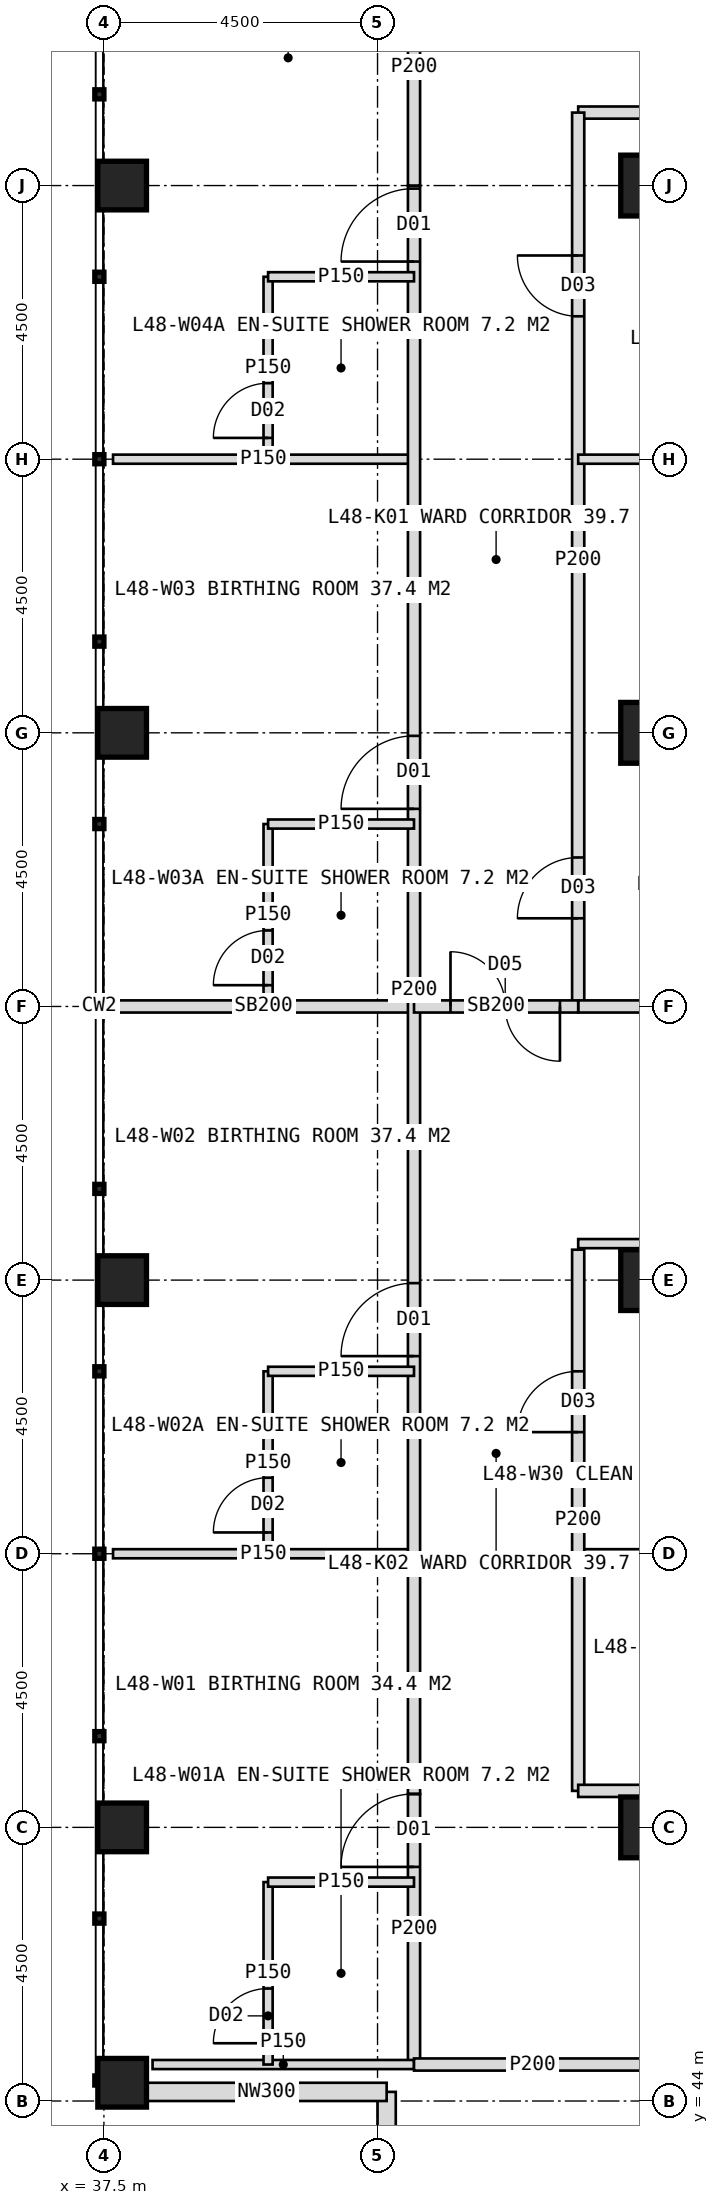
"""IFC4 building model, lengths in metres.
Left out: names, types, materials, properties, quantities, classifications, styles, units other than length and angle.
Written with IfcOpenShell. Run it as: python <this file> out.ifc"""

import sys

from ifc_helpers import new_model, si_unit, direction, frame, frame_2d, origin, origin_2d, place, context, subcontext, project, spatial, rectangle, hollow_rectangle, extrude, element, fill, save


model = new_model("IFC4")
c1 = context("Model", 3, precision=1e-05, world=origin(), true_north=direction((0.0, 1.0)))
c2 = subcontext(c1, "Body", "Model", "MODEL_VIEW")
j1 = project(units=[si_unit("LENGTHUNIT", "METRE"), si_unit("PLANEANGLEUNIT", "RADIAN")], contexts=[c1])
p1 = place(None, origin())
s1 = spatial("IfcSite", under=j1, at=p1, CompositionType="ELEMENT")
p2 = place(p1, origin())
s2 = spatial("IfcBuilding", under=s1, at=p2, CompositionType="ELEMENT")
p3 = place(p2, frame((0.0, 0.0, 201.0)))
s3 = spatial("IfcBuildingStorey", under=s2, at=p3, CompositionType="ELEMENT", Elevation=201.0)
for number, where, z_axis, x_axis in (
    (1, (46.5, 48.5, 0.0), (0.0, 0.0, 1.0), (1.0, 0.0, 0.0)),
    (2, (46.5, 75.5, 0.0), (0.0, 0.0, 1.0), (1.0, 0.0, 0.0)),
    (3, (46.5, 57.5, 0.0), (0.0, 0.0, 1.0), (1.0, 0.0, 0.0)),
    (4, (46.5, 66.5, 0.0), (0.0, 0.0, 1.0), (1.0, 0.0, 0.0)),
):
    element("IfcColumn", number, at=place(p3, frame(where, z_axis=z_axis, x_axis=x_axis)), inside=s3, PredefinedType="COLUMN", context=c2, shape_type="SweptSolid", body=[
        extrude(hollow_rectangle(XDim=1.0, YDim=1.0, WallThickness=0.1, at=origin_2d()), origin(), (0.0, 0.0, 1.0), 4.0),
    ])
for number, where, z_axis, x_axis in (
    (5, (37.8, 44.3, 0.0), (0.0, 0.0, 1.0), (1.0, 0.0, 0.0)),
    (6, (37.8, 48.5, 0.0), (0.0, 0.0, 1.0), (1.0, 0.0, 0.0)),
    (7, (37.8, 57.5, 0.0), (0.0, 0.0, 1.0), (1.0, 0.0, 0.0)),
    (8, (37.8, 66.5, 0.0), (0.0, 0.0, 1.0), (1.0, 0.0, 0.0)),
    (9, (37.8, 75.5, 0.0), (0.0, 0.0, 1.0), (1.0, 0.0, 0.0)),
):
    element("IfcColumn", number, at=place(p3, frame(where, z_axis=z_axis, x_axis=x_axis)), inside=s3, PredefinedType="COLUMN", context=c2, shape_type="SweptSolid", body=[
        extrude(hollow_rectangle(XDim=0.8, YDim=0.8, WallThickness=0.08, at=origin_2d()), origin(), (0.0, 0.0, 1.0), 4.0),
    ])
for number, where, z_axis, x_axis in (
    (10, (42.15, 40.2, 0.0), (0.0, 0.0, 1.0), (0.0, 1.0, 0.0)),
    (11, (42.15, 44.15, 0.0), (0.0, 0.0, 1.0), (-1.0, 0.0, 0.0)),
):
    element("IfcWall", number, at=place(p3, frame(where, z_axis=z_axis, x_axis=x_axis)), inside=s3, PredefinedType="ELEMENTEDWALL", context=c2, shape_type="SweptSolid", body=[
        extrude(rectangle(XDim=3.95, YDim=0.3, at=frame_2d((1.975, 0.0))), origin(), (0.0, 0.0, 1.0), 2.85),
    ])
p4 = place(p3, frame((45.3, 76.7, 0.0), z_axis=(0.0, 0.0, 1.0), x_axis=(1.0, 0.0, 0.0)))
e12 = element("IfcWall", 12, at=p4, inside=s3, PredefinedType="PARTITIONING", context=c2, shape_type="SweptSolid", body=[
    extrude(rectangle(XDim=5.7, YDim=0.2, at=frame_2d((2.85, 0.0))), origin(), (0.0, 0.0, 1.0), 3.75),
])
p5 = place(p3, frame((42.6, 53.0, 0.0), z_axis=(0.0, 0.0, 1.0), x_axis=(-1.0, 0.0, 0.0)))
e13 = element("IfcWall", 13, at=p5, inside=s3, PredefinedType="PARTITIONING", context=c2, shape_type="SweptSolid", body=[
    extrude(rectangle(XDim=4.95, YDim=0.15, at=frame_2d((2.475, 0.0))), origin(), (0.0, 0.0, 1.0), 3.75),
])
p6 = place(p3, frame((42.6, 62.0, 0.0), z_axis=(0.0, 0.0, 1.0), x_axis=(-1.0, 0.0, 0.0)))
e14 = element("IfcWall", 14, at=p6, inside=s3, PredefinedType="SOLIDWALL", context=c2, shape_type="SweptSolid", body=[
    extrude(rectangle(XDim=4.95, YDim=0.2, at=frame_2d((2.475, 0.0))), origin(), (0.0, 0.0, 1.0), 2.95),
])
p7 = place(p3, frame((42.6, 71.0, 0.0), z_axis=(0.0, 0.0, 1.0), x_axis=(-1.0, 0.0, 0.0)))
e15 = element("IfcWall", 15, at=p7, inside=s3, PredefinedType="PARTITIONING", context=c2, shape_type="SweptSolid", body=[
    extrude(rectangle(XDim=4.95, YDim=0.15, at=frame_2d((2.475, 0.0))), origin(), (0.0, 0.0, 1.0), 3.75),
])
p8 = place(p3, frame((42.6, 44.6, 0.0), z_axis=(0.0, 0.0, 1.0), x_axis=(0.0, 1.0, 0.0)))
e16 = element("IfcWall", 16, at=p8, inside=s3, PredefinedType="PARTITIONING", context=c2, shape_type="SweptSolid", body=[
    extrude(rectangle(XDim=4.45, YDim=0.2, at=frame_2d((2.225, 0.0))), origin(), (0.0, 0.0, 1.0), 2.85),
])
p9 = place(p8, frame((3.25, 0.0, 0.0)))
e17 = element("IfcOpeningElement", 17, at=p9, cuts=e16, PredefinedType="OPENING", context=c2, shape_type="SweptSolid", body=[
    extrude(rectangle(XDim=1.2, YDim=2.2, at=frame_2d((0.6, 1.1))), frame((0.0, 0.11, 0.0), z_axis=(0.0, -1.0, 0.0), x_axis=(1.0, 0.0, 0.0)), (0.0, 0.0, 1.0), 0.22),
])
p10 = place(p3, frame((42.6, 49.05, 0.0), z_axis=(0.0, 0.0, 1.0), x_axis=(0.0, 1.0, 0.0)))
e18 = element("IfcWall", 18, at=p10, inside=s3, PredefinedType="PARTITIONING", context=c2, shape_type="SweptSolid", body=[
    extrude(rectangle(XDim=26.45, YDim=0.2, at=frame_2d((13.225, 0.0))), origin(), (0.0, 0.0, 1.0), 3.75),
])
p11 = place(p10, frame((7.2, 0.0, 0.0)))
e19 = element("IfcOpeningElement", 19, at=p11, cuts=e18, PredefinedType="OPENING", context=c2, shape_type="SweptSolid", body=[
    extrude(rectangle(XDim=1.2, YDim=2.2, at=frame_2d((0.6, 1.1))), frame((0.0, 0.11, 0.0), z_axis=(0.0, -1.0, 0.0), x_axis=(1.0, 0.0, 0.0)), (0.0, 0.0, 1.0), 0.22),
])
p12 = place(p10, frame((16.2, 0.0, 0.0)))
e20 = element("IfcOpeningElement", 20, at=p12, cuts=e18, PredefinedType="OPENING", context=c2, shape_type="SweptSolid", body=[
    extrude(rectangle(XDim=1.2, YDim=2.2, at=frame_2d((0.6, 1.1))), frame((0.0, 0.11, 0.0), z_axis=(0.0, -1.0, 0.0), x_axis=(1.0, 0.0, 0.0)), (0.0, 0.0, 1.0), 0.22),
])
p13 = place(p10, frame((25.2, 0.0, 0.0)))
e21 = element("IfcOpeningElement", 21, at=p13, cuts=e18, PredefinedType="OPENING", context=c2, shape_type="SweptSolid", body=[
    extrude(rectangle(XDim=1.2, YDim=2.2, at=frame_2d((0.6, 1.1))), frame((0.0, 0.11, 0.0), z_axis=(0.0, -1.0, 0.0), x_axis=(1.0, 0.0, 0.0)), (0.0, 0.0, 1.0), 0.22),
])
p14 = place(p3, frame((42.6, 75.5, 0.0), z_axis=(0.0, 0.0, 1.0), x_axis=(0.0, 1.0, 0.0)))
e22 = element("IfcWall", 22, at=p14, inside=s3, PredefinedType="PARTITIONING", context=c2, shape_type="SweptSolid", body=[
    extrude(rectangle(XDim=3.9, YDim=0.2, at=frame_2d((1.95, 0.0))), origin(), (0.0, 0.0, 1.0), 2.85),
])
p15 = place(p3, frame((42.6, 44.6, 0.0), z_axis=(0.0, 0.0, 1.0), x_axis=(-1.0, 0.0, 0.0)))
e23 = element("IfcWall", 23, at=p15, inside=s3, PredefinedType="PARTITIONING", context=c2, shape_type="SweptSolid", body=[
    extrude(rectangle(XDim=4.3, YDim=0.15, at=frame_2d((2.15, 0.0))), origin(), (0.0, 0.0, 1.0), 2.85),
])
p16 = place(p3, frame((40.2, 44.6, 0.0), z_axis=(0.0, 0.0, 1.0), x_axis=(0.0, 1.0, 0.0)))
e24 = element("IfcWall", 24, at=p16, inside=s3, PredefinedType="PARTITIONING", context=c2, shape_type="SweptSolid", body=[
    extrude(rectangle(XDim=3.0, YDim=0.15, at=frame_2d((1.5, 0.0))), origin(), (0.0, 0.0, 1.0), 3.75),
])
p17 = place(p16, frame((0.35, 0.0, 0.0)))
e25 = element("IfcOpeningElement", 25, at=p17, cuts=e24, PredefinedType="OPENING", context=c2, shape_type="SweptSolid", body=[
    extrude(rectangle(XDim=0.9, YDim=2.1, at=frame_2d((0.45, 1.05))), frame((0.0, 0.085, 0.0), z_axis=(0.0, -1.0, 0.0), x_axis=(1.0, 0.0, 0.0)), (0.0, 0.0, 1.0), 0.17),
])
p18 = place(p3, frame((42.6, 47.6, 0.0), z_axis=(0.0, 0.0, 1.0), x_axis=(-1.0, 0.0, 0.0)))
e26 = element("IfcWall", 26, at=p18, inside=s3, PredefinedType="PARTITIONING", context=c2, shape_type="SweptSolid", body=[
    extrude(rectangle(XDim=2.4, YDim=0.15, at=frame_2d((1.2, 0.0))), origin(), (0.0, 0.0, 1.0), 3.75),
])
p19 = place(p3, frame((40.2, 53.0, 0.0), z_axis=(0.0, 0.0, 1.0), x_axis=(0.0, 1.0, 0.0)))
e27 = element("IfcWall", 27, at=p19, inside=s3, PredefinedType="PARTITIONING", context=c2, shape_type="SweptSolid", body=[
    extrude(rectangle(XDim=3.0, YDim=0.15, at=frame_2d((1.5, 0.0))), origin(), (0.0, 0.0, 1.0), 3.75),
])
p20 = place(p19, frame((0.35, 0.0, 0.0)))
e28 = element("IfcOpeningElement", 28, at=p20, cuts=e27, PredefinedType="OPENING", context=c2, shape_type="SweptSolid", body=[
    extrude(rectangle(XDim=0.9, YDim=2.1, at=frame_2d((0.45, 1.05))), frame((0.0, 0.085, 0.0), z_axis=(0.0, -1.0, 0.0), x_axis=(1.0, 0.0, 0.0)), (0.0, 0.0, 1.0), 0.17),
])
p21 = place(p3, frame((42.6, 56.0, 0.0), z_axis=(0.0, 0.0, 1.0), x_axis=(-1.0, 0.0, 0.0)))
e29 = element("IfcWall", 29, at=p21, inside=s3, PredefinedType="PARTITIONING", context=c2, shape_type="SweptSolid", body=[
    extrude(rectangle(XDim=2.4, YDim=0.15, at=frame_2d((1.2, 0.0))), origin(), (0.0, 0.0, 1.0), 3.75),
])
p22 = place(p3, frame((40.2, 62.0, 0.0), z_axis=(0.0, 0.0, 1.0), x_axis=(0.0, 1.0, 0.0)))
e30 = element("IfcWall", 30, at=p22, inside=s3, PredefinedType="PARTITIONING", context=c2, shape_type="SweptSolid", body=[
    extrude(rectangle(XDim=3.0, YDim=0.15, at=frame_2d((1.5, 0.0))), origin(), (0.0, 0.0, 1.0), 3.75),
])
p23 = place(p22, frame((0.35, 0.0, 0.0)))
e31 = element("IfcOpeningElement", 31, at=p23, cuts=e30, PredefinedType="OPENING", context=c2, shape_type="SweptSolid", body=[
    extrude(rectangle(XDim=0.9, YDim=2.1, at=frame_2d((0.45, 1.05))), frame((0.0, 0.085, 0.0), z_axis=(0.0, -1.0, 0.0), x_axis=(1.0, 0.0, 0.0)), (0.0, 0.0, 1.0), 0.17),
])
p24 = place(p3, frame((42.6, 65.0, 0.0), z_axis=(0.0, 0.0, 1.0), x_axis=(-1.0, 0.0, 0.0)))
e32 = element("IfcWall", 32, at=p24, inside=s3, PredefinedType="PARTITIONING", context=c2, shape_type="SweptSolid", body=[
    extrude(rectangle(XDim=2.4, YDim=0.15, at=frame_2d((1.2, 0.0))), origin(), (0.0, 0.0, 1.0), 3.75),
])
p25 = place(p3, frame((40.2, 71.0, 0.0), z_axis=(0.0, 0.0, 1.0), x_axis=(0.0, 1.0, 0.0)))
e33 = element("IfcWall", 33, at=p25, inside=s3, PredefinedType="PARTITIONING", context=c2, shape_type="SweptSolid", body=[
    extrude(rectangle(XDim=3.0, YDim=0.15, at=frame_2d((1.5, 0.0))), origin(), (0.0, 0.0, 1.0), 3.75),
])
p26 = place(p25, frame((0.35, 0.0, 0.0)))
e34 = element("IfcOpeningElement", 34, at=p26, cuts=e33, PredefinedType="OPENING", context=c2, shape_type="SweptSolid", body=[
    extrude(rectangle(XDim=0.9, YDim=2.1, at=frame_2d((0.45, 1.05))), frame((0.0, 0.085, 0.0), z_axis=(0.0, -1.0, 0.0), x_axis=(1.0, 0.0, 0.0)), (0.0, 0.0, 1.0), 0.17),
])
p27 = place(p3, frame((42.6, 74.0, 0.0), z_axis=(0.0, 0.0, 1.0), x_axis=(-1.0, 0.0, 0.0)))
e35 = element("IfcWall", 35, at=p27, inside=s3, PredefinedType="PARTITIONING", context=c2, shape_type="SweptSolid", body=[
    extrude(rectangle(XDim=2.4, YDim=0.15, at=frame_2d((1.2, 0.0))), origin(), (0.0, 0.0, 1.0), 3.75),
])
p28 = place(p3, frame((51.0, 53.0, 0.0), z_axis=(0.0, 0.0, 1.0), x_axis=(-1.0, 0.0, 0.0)))
e36 = element("IfcWall", 36, at=p28, inside=s3, PredefinedType="PARTITIONING", context=c2, shape_type="SweptSolid", body=[
    extrude(rectangle(XDim=5.7, YDim=0.15, at=frame_2d((2.85, 0.0))), origin(), (0.0, 0.0, 1.0), 3.75),
])
p29 = place(p3, frame((45.3, 49.1, 0.0), z_axis=(0.0, 0.0, 1.0), x_axis=(0.0, 1.0, 0.0)))
e37 = element("IfcWall", 37, at=p29, inside=s3, PredefinedType="PARTITIONING", context=c2, shape_type="SweptSolid", body=[
    extrude(rectangle(XDim=8.9, YDim=0.2, at=frame_2d((4.45, 0.0))), origin(), (0.0, 0.0, 1.0), 3.75),
])
p30 = place(p29, frame((5.9, 0.0, 0.0)))
e38 = element("IfcOpeningElement", 38, at=p30, cuts=e37, PredefinedType="OPENING", context=c2, shape_type="SweptSolid", body=[
    extrude(rectangle(XDim=1.0, YDim=2.1, at=frame_2d((0.5, 1.05))), frame((0.0, 0.11, 0.0), z_axis=(0.0, -1.0, 0.0), x_axis=(1.0, 0.0, 0.0)), (0.0, 0.0, 1.0), 0.22),
])
p31 = place(p3, frame((45.3, 62.0, 0.0), z_axis=(0.0, 0.0, 1.0), x_axis=(0.0, 1.0, 0.0)))
e39 = element("IfcWall", 39, at=p31, inside=s3, PredefinedType="PARTITIONING", context=c2, shape_type="SweptSolid", body=[
    extrude(rectangle(XDim=14.7, YDim=0.2, at=frame_2d((7.35, 0.0))), origin(), (0.0, 0.0, 1.0), 3.75),
])
p32 = place(p31, frame((1.45, 0.0, 0.0)))
e40 = element("IfcOpeningElement", 40, at=p32, cuts=e39, PredefinedType="OPENING", context=c2, shape_type="SweptSolid", body=[
    extrude(rectangle(XDim=1.0, YDim=2.1, at=frame_2d((0.5, 1.05))), frame((0.0, 0.11, 0.0), z_axis=(0.0, -1.0, 0.0), x_axis=(1.0, 0.0, 0.0)), (0.0, 0.0, 1.0), 0.22),
])
p33 = place(p31, frame((11.35, 0.0, 0.0)))
e41 = element("IfcOpeningElement", 41, at=p33, cuts=e39, PredefinedType="OPENING", context=c2, shape_type="SweptSolid", body=[
    extrude(rectangle(XDim=1.0, YDim=2.1, at=frame_2d((0.5, 1.05))), frame((0.0, 0.11, 0.0), z_axis=(0.0, -1.0, 0.0), x_axis=(1.0, 0.0, 0.0)), (0.0, 0.0, 1.0), 0.22),
])
p34 = place(p3, frame((51.0, 58.1, 0.0), z_axis=(0.0, 0.0, 1.0), x_axis=(-1.0, 0.0, 0.0)))
e42 = element("IfcWall", 42, at=p34, inside=s3, PredefinedType="PARTITIONING", context=c2, shape_type="SweptSolid", body=[
    extrude(rectangle(XDim=5.7, YDim=0.15, at=frame_2d((2.85, 0.0))), origin(), (0.0, 0.0, 1.0), 3.75),
])
p35 = place(p34, frame((0.6, 0.0, 0.0)))
e43 = element("IfcOpeningElement", 43, at=p35, cuts=e42, PredefinedType="OPENING", context=c2, shape_type="SweptSolid", body=[
    extrude(rectangle(XDim=0.9, YDim=2.1, at=frame_2d((0.45, 1.05))), frame((0.0, 0.085, 0.0), z_axis=(0.0, -1.0, 0.0), x_axis=(1.0, 0.0, 0.0)), (0.0, 0.0, 1.0), 0.17),
])
p36 = place(p3, frame((51.0, 62.0, 0.0), z_axis=(0.0, 0.0, 1.0), x_axis=(-1.0, 0.0, 0.0)))
e44 = element("IfcWall", 44, at=p36, inside=s3, PredefinedType="SOLIDWALL", context=c2, shape_type="SweptSolid", body=[
    extrude(rectangle(XDim=5.7, YDim=0.2, at=frame_2d((2.85, 0.0))), origin(), (0.0, 0.0, 1.0), 2.95),
])
p37 = place(p3, frame((51.0, 71.0, 0.0), z_axis=(0.0, 0.0, 1.0), x_axis=(-1.0, 0.0, 0.0)))
e45 = element("IfcWall", 45, at=p37, inside=s3, PredefinedType="PARTITIONING", context=c2, shape_type="SweptSolid", body=[
    extrude(rectangle(XDim=5.7, YDim=0.15, at=frame_2d((2.85, 0.0))), origin(), (0.0, 0.0, 1.0), 3.75),
])
p38 = place(p3, frame((46.5, 44.6, 0.0), z_axis=(0.0, 0.0, 1.0), x_axis=(-1.0, 0.0, 0.0)))
e46 = element("IfcWall", 46, at=p38, inside=s3, PredefinedType="PARTITIONING", context=c2, shape_type="SweptSolid", body=[
    extrude(rectangle(XDim=3.9, YDim=0.2, at=frame_2d((1.95, 0.0))), origin(), (0.0, 0.0, 1.0), 2.85),
])
p39 = place(p3, frame((57.75, 49.1, 0.0), z_axis=(0.0, 0.0, 1.0), x_axis=(-1.0, 0.0, 0.0)))
e47 = element("IfcWall", 47, at=p39, inside=s3, PredefinedType="PARTITIONING", context=c2, shape_type="SweptSolid", body=[
    extrude(rectangle(XDim=12.45, YDim=0.2, at=frame_2d((6.225, 0.0))), origin(), (0.0, 0.0, 1.0), 3.75),
])
p40 = place(p39, frame((0.325, 0.0, 0.0)))
e48 = element("IfcOpeningElement", 48, at=p40, cuts=e47, PredefinedType="OPENING", context=c2, shape_type="SweptSolid", body=[
    extrude(rectangle(XDim=1.0, YDim=2.1, at=frame_2d((0.5, 1.05))), frame((0.0, 0.11, 0.0), z_axis=(0.0, -1.0, 0.0), x_axis=(1.0, 0.0, 0.0)), (0.0, 0.0, 1.0), 0.22),
])
p41 = place(p39, frame((4.75, 0.0, 0.0)))
e49 = element("IfcOpeningElement", 49, at=p41, cuts=e47, PredefinedType="OPENING", context=c2, shape_type="SweptSolid", body=[
    extrude(rectangle(XDim=1.0, YDim=2.1, at=frame_2d((0.5, 1.05))), frame((0.0, 0.11, 0.0), z_axis=(0.0, -1.0, 0.0), x_axis=(1.0, 0.0, 0.0)), (0.0, 0.0, 1.0), 0.22),
])
p42 = place(p39, frame((9.1, 0.0, 0.0)))
e50 = element("IfcOpeningElement", 50, at=p42, cuts=e47, PredefinedType="OPENING", context=c2, shape_type="SweptSolid", body=[
    extrude(rectangle(XDim=1.0, YDim=2.1, at=frame_2d((0.5, 1.05))), frame((0.0, 0.11, 0.0), z_axis=(0.0, -1.0, 0.0), x_axis=(1.0, 0.0, 0.0)), (0.0, 0.0, 1.0), 0.22),
])
p43 = place(p3, frame((45.3, 62.0, 0.0), z_axis=(0.0, 0.0, 1.0), x_axis=(-1.0, 0.0, 0.0)))
e51 = element("IfcWall", 51, at=p43, inside=s3, PredefinedType="SOLIDWALL", context=c2, shape_type="SweptSolid", body=[
    extrude(rectangle(XDim=2.7, YDim=0.2, at=frame_2d((1.35, 0.0))), origin(), (0.0, 0.0, 1.0), 2.95),
])
p44 = place(p43, frame((0.3, 0.0, 0.0)))
e52 = element("IfcOpeningElement", 52, at=p44, cuts=e51, PredefinedType="OPENING", context=c2, shape_type="SweptSolid", body=[
    extrude(rectangle(XDim=1.8, YDim=2.2, at=frame_2d((0.9, 1.1))), frame((0.0, 0.11, 0.0), z_axis=(0.0, -1.0, 0.0), x_axis=(1.0, 0.0, 0.0)), (0.0, 0.0, 1.0), 0.22),
])
p45 = place(p9, origin())
e53 = element("IfcDoor", 53, at=p45, inside=s3, OperationType="SINGLE_SWING_LEFT", PredefinedType="DOOR", context=c2, shape_type="SweptSolid", body=[
    extrude(rectangle(XDim=1.2, YDim=2.2, at=frame_2d((0.6, 1.1))), frame((0.0, 0.025, 0.0), z_axis=(0.0, -1.0, 0.0), x_axis=(1.0, 0.0, 0.0)), (0.0, 0.0, 1.0), 0.05),
])
fill(e17, e53)
p46 = place(p17, origin())
e54 = element("IfcDoor", 54, at=p46, inside=s3, OperationType="SINGLE_SWING_LEFT", PredefinedType="DOOR", context=c2, shape_type="SweptSolid", body=[
    extrude(rectangle(XDim=0.9, YDim=2.1, at=frame_2d((0.45, 1.05))), frame((0.0, 0.025, 0.0), z_axis=(0.0, -1.0, 0.0), x_axis=(1.0, 0.0, 0.0)), (0.0, 0.0, 1.0), 0.05),
])
fill(e25, e54)
p47 = place(p11, origin())
e55 = element("IfcDoor", 55, at=p47, inside=s3, OperationType="SINGLE_SWING_LEFT", PredefinedType="DOOR", context=c2, shape_type="SweptSolid", body=[
    extrude(rectangle(XDim=1.2, YDim=2.2, at=frame_2d((0.6, 1.1))), frame((0.0, 0.025, 0.0), z_axis=(0.0, -1.0, 0.0), x_axis=(1.0, 0.0, 0.0)), (0.0, 0.0, 1.0), 0.05),
])
fill(e19, e55)
p48 = place(p20, origin())
e56 = element("IfcDoor", 56, at=p48, inside=s3, OperationType="SINGLE_SWING_LEFT", PredefinedType="DOOR", context=c2, shape_type="SweptSolid", body=[
    extrude(rectangle(XDim=0.9, YDim=2.1, at=frame_2d((0.45, 1.05))), frame((0.0, 0.025, 0.0), z_axis=(0.0, -1.0, 0.0), x_axis=(1.0, 0.0, 0.0)), (0.0, 0.0, 1.0), 0.05),
])
fill(e28, e56)
p49 = place(p12, origin())
e57 = element("IfcDoor", 57, at=p49, inside=s3, OperationType="SINGLE_SWING_LEFT", PredefinedType="DOOR", context=c2, shape_type="SweptSolid", body=[
    extrude(rectangle(XDim=1.2, YDim=2.2, at=frame_2d((0.6, 1.1))), frame((0.0, 0.025, 0.0), z_axis=(0.0, -1.0, 0.0), x_axis=(1.0, 0.0, 0.0)), (0.0, 0.0, 1.0), 0.05),
])
fill(e20, e57)
p50 = place(p23, origin())
e58 = element("IfcDoor", 58, at=p50, inside=s3, OperationType="SINGLE_SWING_LEFT", PredefinedType="DOOR", context=c2, shape_type="SweptSolid", body=[
    extrude(rectangle(XDim=0.9, YDim=2.1, at=frame_2d((0.45, 1.05))), frame((0.0, 0.025, 0.0), z_axis=(0.0, -1.0, 0.0), x_axis=(1.0, 0.0, 0.0)), (0.0, 0.0, 1.0), 0.05),
])
fill(e31, e58)
p51 = place(p13, origin())
e59 = element("IfcDoor", 59, at=p51, inside=s3, OperationType="SINGLE_SWING_LEFT", PredefinedType="DOOR", context=c2, shape_type="SweptSolid", body=[
    extrude(rectangle(XDim=1.2, YDim=2.2, at=frame_2d((0.6, 1.1))), frame((0.0, 0.025, 0.0), z_axis=(0.0, -1.0, 0.0), x_axis=(1.0, 0.0, 0.0)), (0.0, 0.0, 1.0), 0.05),
])
fill(e21, e59)
p52 = place(p26, origin())
e60 = element("IfcDoor", 60, at=p52, inside=s3, OperationType="SINGLE_SWING_LEFT", PredefinedType="DOOR", context=c2, shape_type="SweptSolid", body=[
    extrude(rectangle(XDim=0.9, YDim=2.1, at=frame_2d((0.45, 1.05))), frame((0.0, 0.025, 0.0), z_axis=(0.0, -1.0, 0.0), x_axis=(1.0, 0.0, 0.0)), (0.0, 0.0, 1.0), 0.05),
])
fill(e34, e60)
p53 = place(p30, origin())
e61 = element("IfcDoor", 61, at=p53, inside=s3, OperationType="SINGLE_SWING_LEFT", PredefinedType="DOOR", context=c2, shape_type="SweptSolid", body=[
    extrude(rectangle(XDim=1.0, YDim=2.1, at=frame_2d((0.5, 1.05))), frame((0.0, 0.025, 0.0), z_axis=(0.0, -1.0, 0.0), x_axis=(1.0, 0.0, 0.0)), (0.0, 0.0, 1.0), 0.05),
])
fill(e38, e61)
p54 = place(p32, origin())
e62 = element("IfcDoor", 62, at=p54, inside=s3, OperationType="SINGLE_SWING_LEFT", PredefinedType="DOOR", context=c2, shape_type="SweptSolid", body=[
    extrude(rectangle(XDim=1.0, YDim=2.1, at=frame_2d((0.5, 1.05))), frame((0.0, 0.025, 0.0), z_axis=(0.0, -1.0, 0.0), x_axis=(1.0, 0.0, 0.0)), (0.0, 0.0, 1.0), 0.05),
])
fill(e40, e62)
p55 = place(p33, origin())
e63 = element("IfcDoor", 63, at=p55, inside=s3, OperationType="SINGLE_SWING_RIGHT", PredefinedType="DOOR", context=c2, shape_type="SweptSolid", body=[
    extrude(rectangle(XDim=1.0, YDim=2.1, at=frame_2d((0.5, 1.05))), frame((0.0, 0.025, 0.0), z_axis=(0.0, -1.0, 0.0), x_axis=(1.0, 0.0, 0.0)), (0.0, 0.0, 1.0), 0.05),
])
fill(e41, e63)
p56 = place(p44, origin())
e64 = element("IfcDoor", 64, at=p56, inside=s3, OperationType="DOUBLE_DOOR_DOUBLE_SWING", PredefinedType="DOOR", context=c2, shape_type="SweptSolid", body=[
    extrude(rectangle(XDim=1.8, YDim=2.2, at=frame_2d((0.9, 1.1))), frame((0.0, 0.025, 0.0), z_axis=(0.0, -1.0, 0.0), x_axis=(1.0, 0.0, 0.0)), (0.0, 0.0, 1.0), 0.05),
])
fill(e52, e64)
save(model, sys.argv[1])
